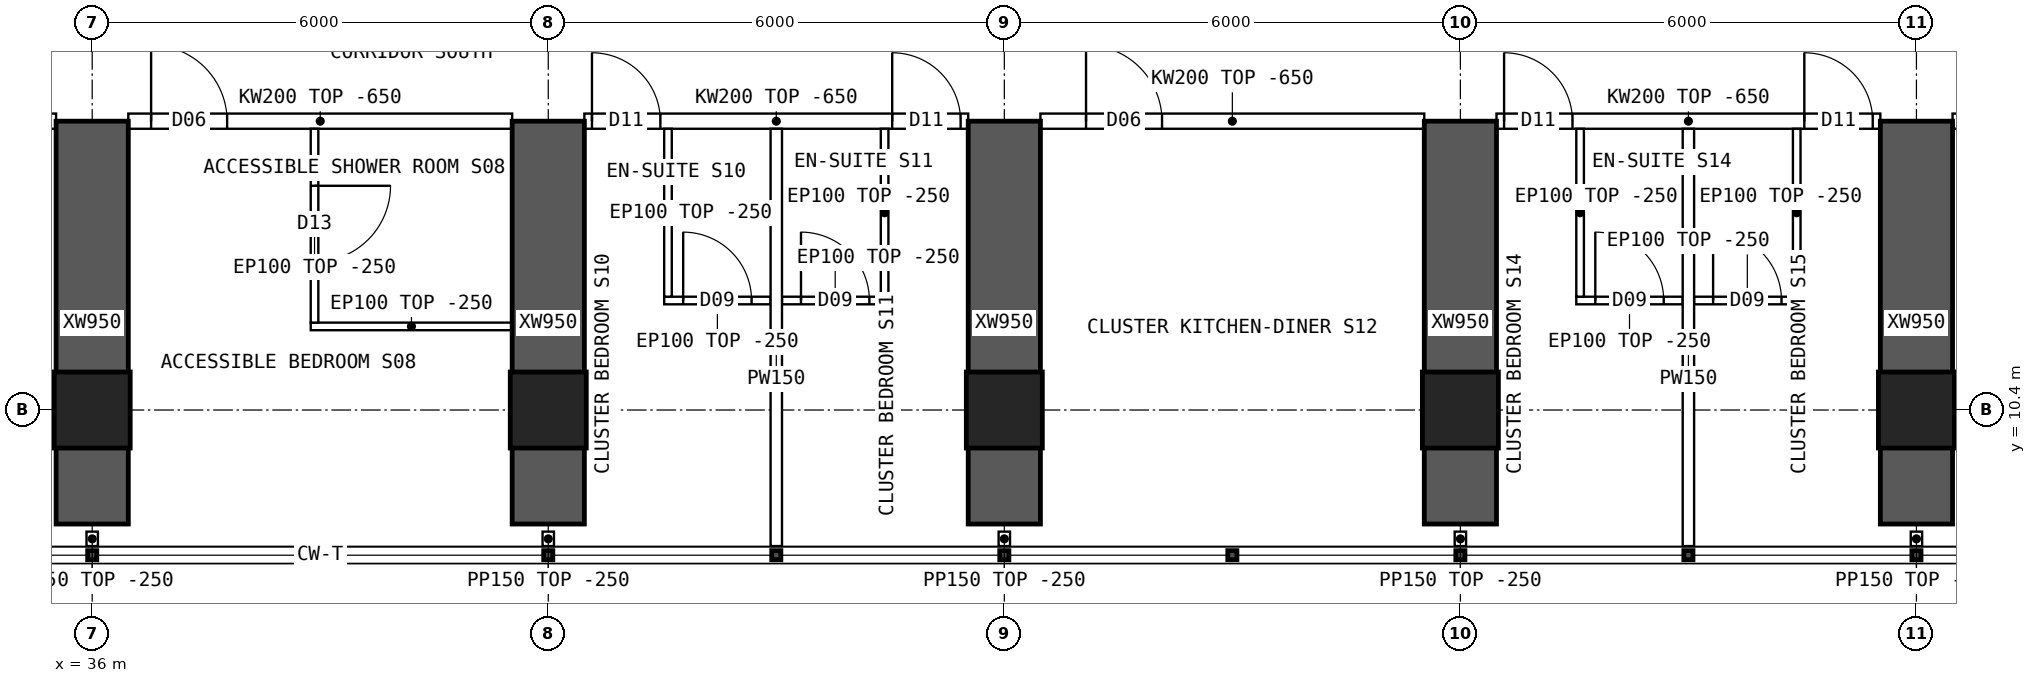
"""IFC4 building model, lengths in metres.
Left out: names, types, materials, properties, quantities, classifications, styles, units other than length and angle.
Written with IfcOpenShell. Run it as: python <this file> out.ifc"""

import sys

from ifc_helpers import new_model, si_unit, direction, frame, frame_2d, origin, origin_2d, place, context, subcontext, project, spatial, polyline, rectangle, hollow_rectangle, outline, extrude, element, fill, save


model = new_model("IFC4")
c1 = context("Model", 3, precision=1e-05, world=origin(), true_north=direction((0.0, 1.0)))
c2 = subcontext(c1, "Body", "Model", "MODEL_VIEW")
j1 = project(units=[si_unit("LENGTHUNIT", "METRE"), si_unit("PLANEANGLEUNIT", "RADIAN")], contexts=[c1])
p1 = place(None, origin())
s1 = spatial("IfcSite", under=j1, at=p1, CompositionType="ELEMENT")
p2 = place(p1, origin())
s2 = spatial("IfcBuilding", under=s1, at=p2, CompositionType="ELEMENT")
p3 = place(p2, frame((0.0, 0.0, 99.4)))
s3 = spatial("IfcBuildingStorey", under=s2, at=p3, CompositionType="ELEMENT", Elevation=99.4)
for number, where, z_axis, x_axis in (
    (1, (36.0, 10.4, 0.0), (0.0, 0.0, 1.0), (1.0, 0.0, 0.0)),
    (2, (42.0, 10.4, 0.0), (0.0, 0.0, 1.0), (1.0, 0.0, 0.0)),
    (3, (48.0, 10.4, 0.0), (0.0, 0.0, 1.0), (1.0, 0.0, 0.0)),
    (4, (54.0, 10.4, 0.0), (0.0, 0.0, 1.0), (1.0, 0.0, 0.0)),
    (5, (60.0, 10.4, 0.0), (0.0, 0.0, 1.0), (1.0, 0.0, 0.0)),
):
    element("IfcColumn", number, at=place(p3, frame(where, z_axis=z_axis, x_axis=x_axis)), inside=s3, PredefinedType="COLUMN", context=c2, shape_type="SweptSolid", body=[
        extrude(hollow_rectangle(XDim=1.0, YDim=1.0, WallThickness=0.1, at=origin_2d()), origin(), (0.0, 0.0, 1.0), 3.75),
    ])
for number, where, z_axis, x_axis in (
    (6, (36.0, 8.9, 0.0), (0.0, 0.0, 1.0), (0.0, 1.0, 0.0)),
    (7, (42.0, 8.9, 0.0), (0.0, 0.0, 1.0), (0.0, 1.0, 0.0)),
    (8, (48.0, 8.9, 0.0), (0.0, 0.0, 1.0), (0.0, 1.0, 0.0)),
    (9, (54.0, 8.9, 0.0), (0.0, 0.0, 1.0), (0.0, 1.0, 0.0)),
    (10, (60.0, 8.9, 0.0), (0.0, 0.0, 1.0), (0.0, 1.0, 0.0)),
):
    element("IfcWall", number, at=place(p3, frame(where, z_axis=z_axis, x_axis=x_axis)), inside=s3, PredefinedType="SHEAR", context=c2, shape_type="SweptSolid", body=[
        extrude(rectangle(XDim=5.3, YDim=0.95, at=frame_2d((2.65, 0.0))), origin(), (0.0, 0.0, 1.0), 3.75),
    ])
p4 = place(p3, frame((30.475, 14.2, 0.0), z_axis=(0.0, 0.0, 1.0), x_axis=(1.0, 0.0, 0.0)))
e11 = element("IfcWall", 11, at=p4, inside=s3, PredefinedType="SOLIDWALL", context=c2, shape_type="SweptSolid", body=[
    extrude(outline(polyline([(0.0, 0.0), (5.05, 0.0), (5.05, 3.1), (0.0, 3.1), (0.0, 0.0)])), frame((0.0, 0.1, 0.0), z_axis=(0.0, -1.0, 0.0), x_axis=(1.0, 0.0, 0.0)), (0.0, 0.0, 1.0), 0.2),
])
p5 = place(p4, frame((0.1, 0.0, 0.0)))
e12 = element("IfcOpeningElement", 12, at=p5, cuts=e11, PredefinedType="OPENING", context=c2, shape_type="SweptSolid", body=[
    extrude(rectangle(XDim=0.9, YDim=2.1, at=frame_2d((0.45, 1.05))), frame((0.0, 0.11, 0.0), z_axis=(0.0, -1.0, 0.0), x_axis=(1.0, 0.0, 0.0)), (0.0, 0.0, 1.0), 0.22),
])
p6 = place(p4, frame((4.05, 0.0, 0.0)))
e13 = element("IfcOpeningElement", 13, at=p6, cuts=e11, PredefinedType="OPENING", context=c2, shape_type="SweptSolid", body=[
    extrude(rectangle(XDim=0.9, YDim=2.1, at=frame_2d((0.45, 1.05))), frame((0.0, 0.11, 0.0), z_axis=(0.0, -1.0, 0.0), x_axis=(1.0, 0.0, 0.0)), (0.0, 0.0, 1.0), 0.22),
])
p7 = place(p3, frame((36.475, 14.2, 0.0), z_axis=(0.0, 0.0, 1.0), x_axis=(1.0, 0.0, 0.0)))
e14 = element("IfcWall", 14, at=p7, inside=s3, PredefinedType="SOLIDWALL", context=c2, shape_type="SweptSolid", body=[
    extrude(outline(polyline([(0.0, 0.0), (5.05, 0.0), (5.05, 3.1), (0.0, 3.1), (0.0, 0.0)])), frame((0.0, 0.1, 0.0), z_axis=(0.0, -1.0, 0.0), x_axis=(1.0, 0.0, 0.0)), (0.0, 0.0, 1.0), 0.2),
])
p8 = place(p7, frame((0.3, 0.0, 0.0)))
e15 = element("IfcOpeningElement", 15, at=p8, cuts=e14, PredefinedType="OPENING", context=c2, shape_type="SweptSolid", body=[
    extrude(rectangle(XDim=1.0, YDim=2.1, at=frame_2d((0.5, 1.05))), frame((0.0, 0.11, 0.0), z_axis=(0.0, -1.0, 0.0), x_axis=(1.0, 0.0, 0.0)), (0.0, 0.0, 1.0), 0.22),
])
p9 = place(p3, frame((42.475, 14.2, 0.0), z_axis=(0.0, 0.0, 1.0), x_axis=(1.0, 0.0, 0.0)))
e16 = element("IfcWall", 16, at=p9, inside=s3, PredefinedType="SOLIDWALL", context=c2, shape_type="SweptSolid", body=[
    extrude(outline(polyline([(0.0, 0.0), (5.05, 0.0), (5.05, 3.1), (0.0, 3.1), (0.0, 0.0)])), frame((0.0, 0.1, 0.0), z_axis=(0.0, -1.0, 0.0), x_axis=(1.0, 0.0, 0.0)), (0.0, 0.0, 1.0), 0.2),
])
p10 = place(p9, frame((0.1, 0.0, 0.0)))
e17 = element("IfcOpeningElement", 17, at=p10, cuts=e16, PredefinedType="OPENING", context=c2, shape_type="SweptSolid", body=[
    extrude(rectangle(XDim=0.9, YDim=2.1, at=frame_2d((0.45, 1.05))), frame((0.0, 0.11, 0.0), z_axis=(0.0, -1.0, 0.0), x_axis=(1.0, 0.0, 0.0)), (0.0, 0.0, 1.0), 0.22),
])
p11 = place(p9, frame((4.05, 0.0, 0.0)))
e18 = element("IfcOpeningElement", 18, at=p11, cuts=e16, PredefinedType="OPENING", context=c2, shape_type="SweptSolid", body=[
    extrude(rectangle(XDim=0.9, YDim=2.1, at=frame_2d((0.45, 1.05))), frame((0.0, 0.11, 0.0), z_axis=(0.0, -1.0, 0.0), x_axis=(1.0, 0.0, 0.0)), (0.0, 0.0, 1.0), 0.22),
])
p12 = place(p3, frame((48.475, 14.2, 0.0), z_axis=(0.0, 0.0, 1.0), x_axis=(1.0, 0.0, 0.0)))
e19 = element("IfcWall", 19, at=p12, inside=s3, PredefinedType="SOLIDWALL", context=c2, shape_type="SweptSolid", body=[
    extrude(outline(polyline([(0.0, 0.0), (5.05, 0.0), (5.05, 3.1), (0.0, 3.1), (0.0, 0.0)])), frame((0.0, 0.1, 0.0), z_axis=(0.0, -1.0, 0.0), x_axis=(1.0, 0.0, 0.0)), (0.0, 0.0, 1.0), 0.2),
])
p13 = place(p12, frame((0.6, 0.0, 0.0)))
e20 = element("IfcOpeningElement", 20, at=p13, cuts=e19, PredefinedType="OPENING", context=c2, shape_type="SweptSolid", body=[
    extrude(rectangle(XDim=1.0, YDim=2.1, at=frame_2d((0.5, 1.05))), frame((0.0, 0.11, 0.0), z_axis=(0.0, -1.0, 0.0), x_axis=(1.0, 0.0, 0.0)), (0.0, 0.0, 1.0), 0.22),
])
p14 = place(p3, frame((54.475, 14.2, 0.0), z_axis=(0.0, 0.0, 1.0), x_axis=(1.0, 0.0, 0.0)))
e21 = element("IfcWall", 21, at=p14, inside=s3, PredefinedType="SOLIDWALL", context=c2, shape_type="SweptSolid", body=[
    extrude(outline(polyline([(0.0, 0.0), (5.05, 0.0), (5.05, 3.1), (0.0, 3.1), (0.0, 0.0)])), frame((0.0, 0.1, 0.0), z_axis=(0.0, -1.0, 0.0), x_axis=(1.0, 0.0, 0.0)), (0.0, 0.0, 1.0), 0.2),
])
p15 = place(p14, frame((0.1, 0.0, 0.0)))
e22 = element("IfcOpeningElement", 22, at=p15, cuts=e21, PredefinedType="OPENING", context=c2, shape_type="SweptSolid", body=[
    extrude(rectangle(XDim=0.9, YDim=2.1, at=frame_2d((0.45, 1.05))), frame((0.0, 0.11, 0.0), z_axis=(0.0, -1.0, 0.0), x_axis=(1.0, 0.0, 0.0)), (0.0, 0.0, 1.0), 0.22),
])
p16 = place(p14, frame((4.05, 0.0, 0.0)))
e23 = element("IfcOpeningElement", 23, at=p16, cuts=e21, PredefinedType="OPENING", context=c2, shape_type="SweptSolid", body=[
    extrude(rectangle(XDim=0.9, YDim=2.1, at=frame_2d((0.45, 1.05))), frame((0.0, 0.11, 0.0), z_axis=(0.0, -1.0, 0.0), x_axis=(1.0, 0.0, 0.0)), (0.0, 0.0, 1.0), 0.22),
])
p17 = place(p3, frame((60.475, 14.2, 0.0), z_axis=(0.0, 0.0, 1.0), x_axis=(1.0, 0.0, 0.0)))
e24 = element("IfcWall", 24, at=p17, inside=s3, PredefinedType="SOLIDWALL", context=c2, shape_type="SweptSolid", body=[
    extrude(outline(polyline([(0.0, 0.0), (5.05, 0.0), (5.05, 3.1), (0.0, 3.1), (0.0, 0.0)])), frame((0.0, 0.1, 0.0), z_axis=(0.0, -1.0, 0.0), x_axis=(1.0, 0.0, 0.0)), (0.0, 0.0, 1.0), 0.2),
])
p18 = place(p17, frame((0.1, 0.0, 0.0)))
e25 = element("IfcOpeningElement", 25, at=p18, cuts=e24, PredefinedType="OPENING", context=c2, shape_type="SweptSolid", body=[
    extrude(rectangle(XDim=0.9, YDim=2.1, at=frame_2d((0.45, 1.05))), frame((0.0, 0.11, 0.0), z_axis=(0.0, -1.0, 0.0), x_axis=(1.0, 0.0, 0.0)), (0.0, 0.0, 1.0), 0.22),
])
p19 = place(p17, frame((4.05, 0.0, 0.0)))
e26 = element("IfcOpeningElement", 26, at=p19, cuts=e24, PredefinedType="OPENING", context=c2, shape_type="SweptSolid", body=[
    extrude(rectangle(XDim=0.9, YDim=2.1, at=frame_2d((0.45, 1.05))), frame((0.0, 0.11, 0.0), z_axis=(0.0, -1.0, 0.0), x_axis=(1.0, 0.0, 0.0)), (0.0, 0.0, 1.0), 0.22),
])
p20 = place(p3, frame((38.875, 11.5, 0.0), z_axis=(0.0, 0.0, 1.0), x_axis=(1.0, 0.0, 0.0)))
e27 = element("IfcWall", 27, at=p20, inside=s3, PredefinedType="PARTITIONING", context=c2, shape_type="SweptSolid", body=[
    extrude(rectangle(XDim=2.65, YDim=0.1, at=frame_2d((1.325, 0.0))), origin(), (0.0, 0.0, 1.0), 3.5),
])
p21 = place(p3, frame((38.925, 11.55, 0.0), z_axis=(0.0, 0.0, 1.0), x_axis=(0.0, 1.0, 0.0)))
e28 = element("IfcWall", 28, at=p21, inside=s3, PredefinedType="PARTITIONING", context=c2, shape_type="SweptSolid", body=[
    extrude(outline(polyline([(0.0, 0.0), (2.55, 0.0), (2.55, 3.1), (2.502, 3.1), (2.5, 3.5), (0.0, 3.5), (0.0, 0.0)])), frame((0.0, 0.05, 0.0), z_axis=(0.0, -1.0, 0.0), x_axis=(1.0, 0.0, 0.0)), (0.0, 0.0, 1.0), 0.1),
])
p22 = place(p21, frame((0.8, 0.0, 0.0)))
e29 = element("IfcOpeningElement", 29, at=p22, cuts=e28, PredefinedType="OPENING", context=c2, shape_type="SweptSolid", body=[
    extrude(rectangle(XDim=1.0, YDim=2.1, at=frame_2d((0.5, 1.05))), frame((0.0, 0.06, 0.0), z_axis=(0.0, -1.0, 0.0), x_axis=(1.0, 0.0, 0.0)), (0.0, 0.0, 1.0), 0.12),
])
p23 = place(p3, frame((45.0, 8.61, 0.0), z_axis=(0.0, 0.0, 1.0), x_axis=(0.0, 1.0, 0.0)))
e30 = element("IfcWall", 30, at=p23, inside=s3, PredefinedType="PARTITIONING", context=c2, shape_type="SweptSolid", body=[
    extrude(outline(polyline([(0.0, 0.0), (5.49, 0.0), (5.49, 3.1), (5.442, 3.1), (5.44, 3.5), (1.992, 3.5), (1.99, 3.1), (1.592, 3.1), (1.59, 3.5), (0.0, 3.5), (0.0, 0.0)])), frame((0.0, 0.075, 0.0), z_axis=(0.0, -1.0, 0.0), x_axis=(1.0, 0.0, 0.0)), (0.0, 0.0, 1.0), 0.15),
])
p24 = place(p3, frame((44.925, 11.841, 0.0), z_axis=(0.0, 0.0, 1.0), x_axis=(-1.0, 0.0, 0.0)))
e31 = element("IfcWall", 31, at=p24, inside=s3, PredefinedType="PARTITIONING", context=c2, shape_type="SweptSolid", body=[
    extrude(rectangle(XDim=1.4, YDim=0.1, at=frame_2d((0.7, 0.0))), origin(), (0.0, 0.0, 1.0), 3.5),
])
p25 = place(p24, frame((0.25, 0.0, 0.0)))
e32 = element("IfcOpeningElement", 32, at=p25, cuts=e31, PredefinedType="OPENING", context=c2, shape_type="SweptSolid", body=[
    extrude(rectangle(XDim=0.9, YDim=2.1, at=frame_2d((0.45, 1.05))), frame((0.0, 0.06, 0.0), z_axis=(0.0, -1.0, 0.0), x_axis=(1.0, 0.0, 0.0)), (0.0, 0.0, 1.0), 0.12),
])
p26 = place(p3, frame((43.575, 11.891, 0.0), z_axis=(0.0, 0.0, 1.0), x_axis=(0.0, 1.0, 0.0)))
e33 = element("IfcWall", 33, at=p26, inside=s3, PredefinedType="PARTITIONING", context=c2, shape_type="SweptSolid", body=[
    extrude(outline(polyline([(0.0, 0.0), (2.209, 0.0), (2.209, 3.1), (2.161, 3.1), (2.159, 3.5), (0.0, 3.5), (0.0, 0.0)])), frame((0.0, 0.05, 0.0), z_axis=(0.0, -1.0, 0.0), x_axis=(1.0, 0.0, 0.0)), (0.0, 0.0, 1.0), 0.1),
])
p27 = place(p3, frame((46.475, 11.841, 0.0), z_axis=(0.0, 0.0, 1.0), x_axis=(-1.0, 0.0, 0.0)))
e34 = element("IfcWall", 34, at=p27, inside=s3, PredefinedType="PARTITIONING", context=c2, shape_type="SweptSolid", body=[
    extrude(rectangle(XDim=1.4, YDim=0.1, at=frame_2d((0.7, 0.0))), origin(), (0.0, 0.0, 1.0), 3.5),
])
p28 = place(p27, frame((0.25, 0.0, 0.0)))
e35 = element("IfcOpeningElement", 35, at=p28, cuts=e34, PredefinedType="OPENING", context=c2, shape_type="SweptSolid", body=[
    extrude(rectangle(XDim=0.9, YDim=2.1, at=frame_2d((0.45, 1.05))), frame((0.0, 0.06, 0.0), z_axis=(0.0, -1.0, 0.0), x_axis=(1.0, 0.0, 0.0)), (0.0, 0.0, 1.0), 0.12),
])
p29 = place(p3, frame((46.425, 11.891, 0.0), z_axis=(0.0, 0.0, 1.0), x_axis=(0.0, 1.0, 0.0)))
e36 = element("IfcWall", 36, at=p29, inside=s3, PredefinedType="PARTITIONING", context=c2, shape_type="SweptSolid", body=[
    extrude(outline(polyline([(0.0, 0.0), (2.209, 0.0), (2.209, 3.1), (2.161, 3.1), (2.159, 3.5), (0.0, 3.5), (0.0, 0.0)])), frame((0.0, 0.05, 0.0), z_axis=(0.0, -1.0, 0.0), x_axis=(1.0, 0.0, 0.0)), (0.0, 0.0, 1.0), 0.1),
])
p30 = place(p3, frame((57.0, 8.61, 0.0), z_axis=(0.0, 0.0, 1.0), x_axis=(0.0, 1.0, 0.0)))
e37 = element("IfcWall", 37, at=p30, inside=s3, PredefinedType="PARTITIONING", context=c2, shape_type="SweptSolid", body=[
    extrude(outline(polyline([(0.0, 0.0), (5.49, 0.0), (5.49, 3.1), (5.442, 3.1), (5.44, 3.5), (1.992, 3.5), (1.99, 3.1), (1.592, 3.1), (1.59, 3.5), (0.0, 3.5), (0.0, 0.0)])), frame((0.0, 0.075, 0.0), z_axis=(0.0, -1.0, 0.0), x_axis=(1.0, 0.0, 0.0)), (0.0, 0.0, 1.0), 0.15),
])
p31 = place(p3, frame((56.925, 11.841, 0.0), z_axis=(0.0, 0.0, 1.0), x_axis=(-1.0, 0.0, 0.0)))
e38 = element("IfcWall", 38, at=p31, inside=s3, PredefinedType="PARTITIONING", context=c2, shape_type="SweptSolid", body=[
    extrude(rectangle(XDim=1.4, YDim=0.1, at=frame_2d((0.7, 0.0))), origin(), (0.0, 0.0, 1.0), 3.5),
])
p32 = place(p31, frame((0.25, 0.0, 0.0)))
e39 = element("IfcOpeningElement", 39, at=p32, cuts=e38, PredefinedType="OPENING", context=c2, shape_type="SweptSolid", body=[
    extrude(rectangle(XDim=0.9, YDim=2.1, at=frame_2d((0.45, 1.05))), frame((0.0, 0.06, 0.0), z_axis=(0.0, -1.0, 0.0), x_axis=(1.0, 0.0, 0.0)), (0.0, 0.0, 1.0), 0.12),
])
p33 = place(p3, frame((55.575, 11.891, 0.0), z_axis=(0.0, 0.0, 1.0), x_axis=(0.0, 1.0, 0.0)))
e40 = element("IfcWall", 40, at=p33, inside=s3, PredefinedType="PARTITIONING", context=c2, shape_type="SweptSolid", body=[
    extrude(outline(polyline([(0.0, 0.0), (2.209, 0.0), (2.209, 3.1), (2.161, 3.1), (2.159, 3.5), (0.0, 3.5), (0.0, 0.0)])), frame((0.0, 0.05, 0.0), z_axis=(0.0, -1.0, 0.0), x_axis=(1.0, 0.0, 0.0)), (0.0, 0.0, 1.0), 0.1),
])
p34 = place(p3, frame((58.475, 11.841, 0.0), z_axis=(0.0, 0.0, 1.0), x_axis=(-1.0, 0.0, 0.0)))
e41 = element("IfcWall", 41, at=p34, inside=s3, PredefinedType="PARTITIONING", context=c2, shape_type="SweptSolid", body=[
    extrude(rectangle(XDim=1.4, YDim=0.1, at=frame_2d((0.7, 0.0))), origin(), (0.0, 0.0, 1.0), 3.5),
])
p35 = place(p34, frame((0.25, 0.0, 0.0)))
e42 = element("IfcOpeningElement", 42, at=p35, cuts=e41, PredefinedType="OPENING", context=c2, shape_type="SweptSolid", body=[
    extrude(rectangle(XDim=0.9, YDim=2.1, at=frame_2d((0.45, 1.05))), frame((0.0, 0.06, 0.0), z_axis=(0.0, -1.0, 0.0), x_axis=(1.0, 0.0, 0.0)), (0.0, 0.0, 1.0), 0.12),
])
p36 = place(p3, frame((58.425, 11.891, 0.0), z_axis=(0.0, 0.0, 1.0), x_axis=(0.0, 1.0, 0.0)))
e43 = element("IfcWall", 43, at=p36, inside=s3, PredefinedType="PARTITIONING", context=c2, shape_type="SweptSolid", body=[
    extrude(outline(polyline([(0.0, 0.0), (2.209, 0.0), (2.209, 3.1), (2.161, 3.1), (2.159, 3.5), (0.0, 3.5), (0.0, 0.0)])), frame((0.0, 0.05, 0.0), z_axis=(0.0, -1.0, 0.0), x_axis=(1.0, 0.0, 0.0)), (0.0, 0.0, 1.0), 0.1),
])
for number, where, z_axis, x_axis in (
    (44, (36.0, 8.8, 0.0), (0.0, 0.0, 1.0), (0.0, -1.0, 0.0)),
    (45, (42.0, 8.8, 0.0), (0.0, 0.0, 1.0), (0.0, -1.0, 0.0)),
    (46, (48.0, 8.8, 0.0), (0.0, 0.0, 1.0), (0.0, -1.0, 0.0)),
    (47, (54.0, 8.8, 0.0), (0.0, 0.0, 1.0), (0.0, -1.0, 0.0)),
    (48, (60.0, 8.8, 0.0), (0.0, 0.0, 1.0), (0.0, -1.0, 0.0)),
):
    element("IfcWall", number, at=place(p3, frame(where, z_axis=z_axis, x_axis=x_axis)), inside=s3, PredefinedType="PARTITIONING", context=c2, shape_type="SweptSolid", body=[
        extrude(rectangle(XDim=0.19, YDim=0.15, at=frame_2d((0.095, 0.0))), origin(), (0.0, 0.0, 1.0), 3.5),
    ])
p37 = place(p22, origin())
e49 = element("IfcDoor", 49, at=p37, inside=s3, OperationType="SINGLE_SWING_RIGHT", PredefinedType="DOOR", context=c2, shape_type="SweptSolid", body=[
    extrude(rectangle(XDim=1.0, YDim=2.1, at=frame_2d((0.5, 1.05))), frame((0.0, 0.025, 0.0), z_axis=(0.0, -1.0, 0.0), x_axis=(1.0, 0.0, 0.0)), (0.0, 0.0, 1.0), 0.05),
])
fill(e29, e49)
p38 = place(p8, origin())
e50 = element("IfcDoor", 50, at=p38, inside=s3, OperationType="SINGLE_SWING_LEFT", PredefinedType="DOOR", context=c2, shape_type="SweptSolid", body=[
    extrude(rectangle(XDim=1.0, YDim=2.1, at=frame_2d((0.5, 1.05))), frame((0.0, 0.025, 0.0), z_axis=(0.0, -1.0, 0.0), x_axis=(1.0, 0.0, 0.0)), (0.0, 0.0, 1.0), 0.05),
])
fill(e15, e50)
p39 = place(p25, origin())
e51 = element("IfcDoor", 51, at=p39, inside=s3, OperationType="SINGLE_SWING_RIGHT", PredefinedType="DOOR", context=c2, shape_type="SweptSolid", body=[
    extrude(rectangle(XDim=0.9, YDim=2.1, at=frame_2d((0.45, 1.05))), frame((0.0, 0.025, 0.0), z_axis=(0.0, -1.0, 0.0), x_axis=(1.0, 0.0, 0.0)), (0.0, 0.0, 1.0), 0.05),
])
fill(e32, e51)
p40 = place(p10, origin())
e52 = element("IfcDoor", 52, at=p40, inside=s3, OperationType="SINGLE_SWING_LEFT", PredefinedType="DOOR", context=c2, shape_type="SweptSolid", body=[
    extrude(rectangle(XDim=0.9, YDim=2.1, at=frame_2d((0.45, 1.05))), frame((0.0, 0.025, 0.0), z_axis=(0.0, -1.0, 0.0), x_axis=(1.0, 0.0, 0.0)), (0.0, 0.0, 1.0), 0.05),
])
fill(e17, e52)
p41 = place(p28, origin())
e53 = element("IfcDoor", 53, at=p41, inside=s3, OperationType="SINGLE_SWING_RIGHT", PredefinedType="DOOR", context=c2, shape_type="SweptSolid", body=[
    extrude(rectangle(XDim=0.9, YDim=2.1, at=frame_2d((0.45, 1.05))), frame((0.0, 0.025, 0.0), z_axis=(0.0, -1.0, 0.0), x_axis=(1.0, 0.0, 0.0)), (0.0, 0.0, 1.0), 0.05),
])
fill(e35, e53)
p42 = place(p11, origin())
e54 = element("IfcDoor", 54, at=p42, inside=s3, OperationType="SINGLE_SWING_LEFT", PredefinedType="DOOR", context=c2, shape_type="SweptSolid", body=[
    extrude(rectangle(XDim=0.9, YDim=2.1, at=frame_2d((0.45, 1.05))), frame((0.0, 0.025, 0.0), z_axis=(0.0, -1.0, 0.0), x_axis=(1.0, 0.0, 0.0)), (0.0, 0.0, 1.0), 0.05),
])
fill(e18, e54)
p43 = place(p13, origin())
e55 = element("IfcDoor", 55, at=p43, inside=s3, OperationType="SINGLE_SWING_LEFT", PredefinedType="DOOR", context=c2, shape_type="SweptSolid", body=[
    extrude(rectangle(XDim=1.0, YDim=2.1, at=frame_2d((0.5, 1.05))), frame((0.0, 0.025, 0.0), z_axis=(0.0, -1.0, 0.0), x_axis=(1.0, 0.0, 0.0)), (0.0, 0.0, 1.0), 0.05),
])
fill(e20, e55)
p44 = place(p32, origin())
e56 = element("IfcDoor", 56, at=p44, inside=s3, OperationType="SINGLE_SWING_RIGHT", PredefinedType="DOOR", context=c2, shape_type="SweptSolid", body=[
    extrude(rectangle(XDim=0.9, YDim=2.1, at=frame_2d((0.45, 1.05))), frame((0.0, 0.025, 0.0), z_axis=(0.0, -1.0, 0.0), x_axis=(1.0, 0.0, 0.0)), (0.0, 0.0, 1.0), 0.05),
])
fill(e39, e56)
p45 = place(p15, origin())
e57 = element("IfcDoor", 57, at=p45, inside=s3, OperationType="SINGLE_SWING_LEFT", PredefinedType="DOOR", context=c2, shape_type="SweptSolid", body=[
    extrude(rectangle(XDim=0.9, YDim=2.1, at=frame_2d((0.45, 1.05))), frame((0.0, 0.025, 0.0), z_axis=(0.0, -1.0, 0.0), x_axis=(1.0, 0.0, 0.0)), (0.0, 0.0, 1.0), 0.05),
])
fill(e22, e57)
p46 = place(p35, origin())
e58 = element("IfcDoor", 58, at=p46, inside=s3, OperationType="SINGLE_SWING_RIGHT", PredefinedType="DOOR", context=c2, shape_type="SweptSolid", body=[
    extrude(rectangle(XDim=0.9, YDim=2.1, at=frame_2d((0.45, 1.05))), frame((0.0, 0.025, 0.0), z_axis=(0.0, -1.0, 0.0), x_axis=(1.0, 0.0, 0.0)), (0.0, 0.0, 1.0), 0.05),
])
fill(e42, e58)
p47 = place(p16, origin())
e59 = element("IfcDoor", 59, at=p47, inside=s3, OperationType="SINGLE_SWING_LEFT", PredefinedType="DOOR", context=c2, shape_type="SweptSolid", body=[
    extrude(rectangle(XDim=0.9, YDim=2.1, at=frame_2d((0.45, 1.05))), frame((0.0, 0.025, 0.0), z_axis=(0.0, -1.0, 0.0), x_axis=(1.0, 0.0, 0.0)), (0.0, 0.0, 1.0), 0.05),
])
fill(e23, e59)
save(model, sys.argv[1])
